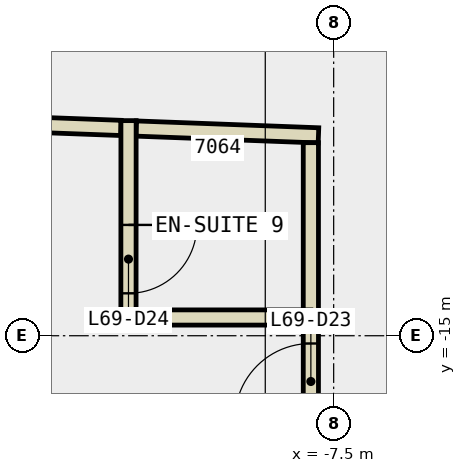
"""IFC4 building model, lengths in metres.
Left out: names, types, materials, properties, quantities, classifications, styles, units other than length and angle.
Written with IfcOpenShell. Run it as: python <this file> out.ifc"""

import sys

from ifc_helpers import new_model, si_unit, direction, frame, frame_2d, origin, place, context, subcontext, project, spatial, rectangle, extrude, element, fill, save


model = new_model("IFC4")
c1 = context("Model", 3, precision=1e-05, world=origin(), true_north=direction((0.0, 1.0)))
c2 = subcontext(c1, "Body", "Model", "MODEL_VIEW")
j1 = project(units=[si_unit("LENGTHUNIT", "METRE"), si_unit("PLANEANGLEUNIT", "RADIAN")], contexts=[c1])
p1 = place(None, origin())
s1 = spatial("IfcSite", under=j1, at=p1, CompositionType="ELEMENT")
p2 = place(p1, origin())
s2 = spatial("IfcBuilding", under=s1, at=p2, CompositionType="ELEMENT")
p3 = place(p2, frame((0.0, 0.0, 297.2)))
s3 = spatial("IfcBuildingStorey", under=s2, at=p3, CompositionType="ELEMENT", Elevation=297.2)
p4 = place(p3, frame((-10.299, -12.266, 0.0), z_axis=(0.0, 0.0, 1.0), x_axis=(-0.999313019426, 0.03706061529, 0.0)))
e1 = element("IfcWall", 1, at=p4, inside=s3, PredefinedType="PARTITIONING", context=c2, shape_type="SweptSolid", body=[
    extrude(rectangle(XDim=1.107, YDim=0.2, at=frame_2d((0.553, 0.0))), origin(), (0.0, 0.0, 1.0), 3.26),
])
p5 = place(p3, frame((-7.7, -12.364, 0.0), z_axis=(0.0, 0.0, 1.0), x_axis=(-0.999295758095, 0.037523164215, 0.0)))
e2 = element("IfcWall", 2, at=p5, inside=s3, PredefinedType="PARTITIONING", context=c2, shape_type="SweptSolid", body=[
    extrude(rectangle(XDim=2.401, YDim=0.2, at=frame_2d((1.2, 0.0))), origin(), (0.0, 0.0, 1.0), 3.26),
])
p6 = place(p3, frame((-7.8, -16.444, 0.0), z_axis=(0.0, 0.0, 1.0), x_axis=(0.0, 1.0, 0.0)))
e3 = element("IfcWall", 3, at=p6, inside=s3, PredefinedType="PARTITIONING", context=c2, shape_type="SweptSolid", body=[
    extrude(rectangle(XDim=1.584, YDim=0.2, at=frame_2d((0.792, 0.0))), origin(), (0.0, 0.0, 1.0), 3.26),
])
p7 = place(p6, frame((0.342, 0.0, 0.0)))
e4 = element("IfcOpeningElement", 4, at=p7, cuts=e3, PredefinedType="OPENING", context=c2, shape_type="SweptSolid", body=[
    extrude(rectangle(XDim=1.0, YDim=2.1, at=frame_2d((0.5, 1.05))), frame((0.0, 0.11, 0.0), z_axis=(0.0, -1.0, 0.0), x_axis=(1.0, 0.0, 0.0)), (0.0, 0.0, 1.0), 0.22),
])
p8 = place(p3, frame((-7.8, -14.86, 0.0), z_axis=(0.0, 0.0, 1.0), x_axis=(0.0, 1.0, 0.0)))
e5 = element("IfcWall", 5, at=p8, inside=s3, PredefinedType="PARTITIONING", context=c2, shape_type="SweptSolid", body=[
    extrude(rectangle(XDim=2.4, YDim=0.2, at=frame_2d((1.2, 0.0))), origin(), (0.0, 0.0, 1.0), 3.26),
])
p9 = place(p3, frame((-10.199, -12.17, 0.0), z_axis=(0.0, 0.0, 1.0), x_axis=(-0.000363009324, -0.999999934112, 0.0)))
e6 = element("IfcWall", 6, at=p9, inside=s3, PredefinedType="PARTITIONING", context=c2, shape_type="SweptSolid", body=[
    extrude(rectangle(XDim=2.69, YDim=0.2, at=frame_2d((1.345, 0.0))), origin(), (0.0, 0.0, 1.0), 3.26),
])
p10 = place(p9, frame((1.372, 0.0, 0.0)))
e7 = element("IfcOpeningElement", 7, at=p10, cuts=e6, PredefinedType="OPENING", context=c2, shape_type="SweptSolid", body=[
    extrude(rectangle(XDim=0.9, YDim=2.1, at=frame_2d((0.45, 1.05))), frame((0.0, 0.11, 0.0), z_axis=(0.0, -1.0, 0.0), x_axis=(1.0, 0.0, 0.0)), (0.0, 0.0, 1.0), 0.22),
])
p11 = place(p3, frame((-10.1, -14.76, 0.0), z_axis=(0.0, 0.0, 1.0), x_axis=(1.0, 0.0, 0.0)))
e8 = element("IfcWall", 8, at=p11, inside=s3, PredefinedType="PARTITIONING", context=c2, shape_type="SweptSolid", body=[
    extrude(rectangle(XDim=2.3, YDim=0.2, at=frame_2d((1.15, 0.0))), origin(), (0.0, 0.0, 1.0), 3.26),
])
p12 = place(p7, origin())
e9 = element("IfcDoor", 9, at=p12, inside=s3, OperationType="SINGLE_SWING_RIGHT", PredefinedType="DOOR", context=c2, shape_type="SweptSolid", body=[
    extrude(rectangle(XDim=1.0, YDim=2.1, at=frame_2d((0.5, 1.05))), frame((0.0, 0.025, 0.0), z_axis=(0.0, -1.0, 0.0), x_axis=(1.0, 0.0, 0.0)), (0.0, 0.0, 1.0), 0.05),
])
fill(e4, e9)
p13 = place(p10, origin())
e10 = element("IfcDoor", 10, at=p13, inside=s3, OperationType="SINGLE_SWING_RIGHT", PredefinedType="DOOR", context=c2, shape_type="SweptSolid", body=[
    extrude(rectangle(XDim=0.9, YDim=2.1, at=frame_2d((0.45, 1.05))), frame((0.0, 0.025, 0.0), z_axis=(0.0, -1.0, 0.0), x_axis=(1.0, 0.0, 0.0)), (0.0, 0.0, 1.0), 0.05),
])
fill(e7, e10)
save(model, sys.argv[1])
